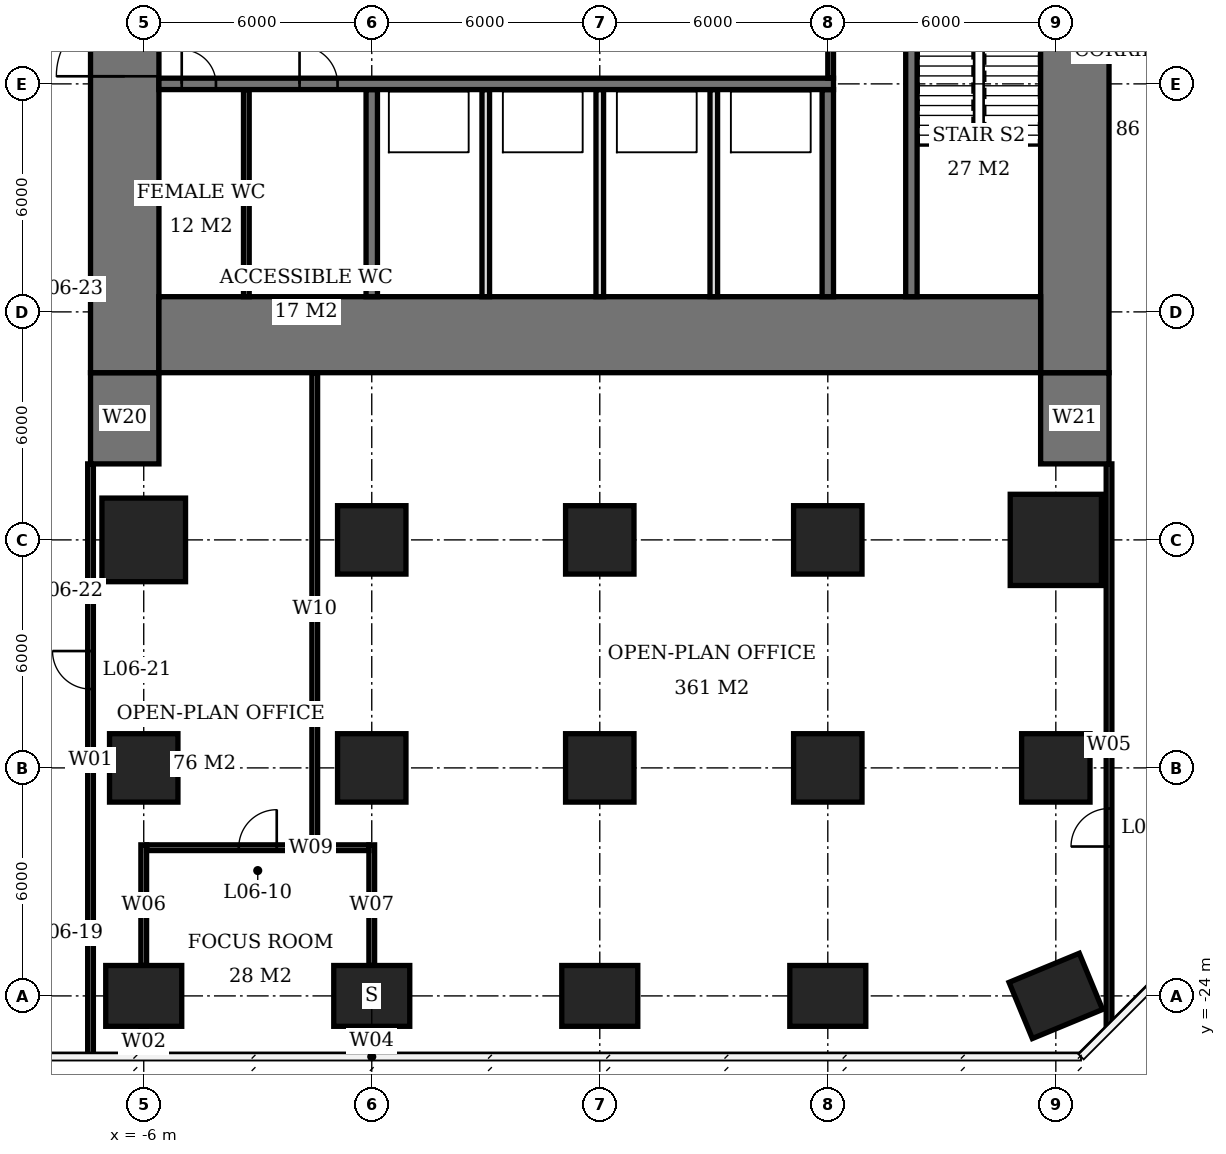
"""IFC4 building model, lengths in metres.
Left out: names, types, materials, properties, quantities, classifications, styles, units other than length and angle.
Written with IfcOpenShell. Run it as: python <this file> out.ifc"""

import sys

from ifc_helpers import new_model, si_unit, direction, frame, frame_2d, origin, origin_2d, place, context, subcontext, project, spatial, rectangle, extrude, element, fill, save


model = new_model("IFC4")
c1 = context("Model", 3, precision=1e-05, world=origin(), true_north=direction((0.0, 1.0)))
c2 = subcontext(c1, "Body", "Model", "MODEL_VIEW")
j1 = project(units=[si_unit("LENGTHUNIT", "METRE"), si_unit("PLANEANGLEUNIT", "RADIAN")], contexts=[c1])
p1 = place(None, origin())
s1 = spatial("IfcSite", under=j1, at=p1, CompositionType="ELEMENT")
p2 = place(p1, origin())
s2 = spatial("IfcBuilding", under=s1, at=p2, CompositionType="ELEMENT")
p3 = place(p2, frame((0.0, 0.0, 29.9)))
s3 = spatial("IfcBuildingStorey", under=s2, at=p3, CompositionType="ELEMENT", Elevation=29.9)
p4 = place(p3, frame((-6.0, -24.0, 0.0), z_axis=(0.0, 0.0, 1.0), x_axis=(1.0, 0.0, 0.0)))
e1 = element("IfcColumn", 1, at=p4, inside=s3, PredefinedType="COLUMN", context=c2, shape_type="SweptSolid", body=[
    extrude(rectangle(XDim=2.0, YDim=1.6, at=origin_2d()), origin(), (0.0, 0.0, 1.0), 3.9),
])
p5 = place(p3, frame((-6.0, -18.0, 0.0), z_axis=(0.0, 0.0, 1.0), x_axis=(1.0, 0.0, 0.0)))
e2 = element("IfcColumn", 2, at=p5, inside=s3, PredefinedType="COLUMN", context=c2, shape_type="SweptSolid", body=[
    extrude(rectangle(XDim=1.8, YDim=1.8, at=origin_2d()), origin(), (0.0, 0.0, 1.0), 3.9),
])
p6 = place(p3, frame((-6.0, -12.0, 0.0), z_axis=(0.0, 0.0, 1.0), x_axis=(1.0, 0.0, 0.0)))
e3 = element("IfcColumn", 3, at=p6, inside=s3, PredefinedType="COLUMN", context=c2, shape_type="SweptSolid", body=[
    extrude(rectangle(XDim=2.2, YDim=2.2, at=origin_2d()), origin(), (0.0, 0.0, 1.0), 3.9),
])
p7 = place(p3, frame((0.0, -24.0, 0.0), z_axis=(0.0, 0.0, 1.0), x_axis=(1.0, 0.0, 0.0)))
e4 = element("IfcColumn", 4, at=p7, inside=s3, PredefinedType="COLUMN", context=c2, shape_type="SweptSolid", body=[
    extrude(rectangle(XDim=2.0, YDim=1.6, at=origin_2d()), origin(), (0.0, 0.0, 1.0), 3.9),
])
for number, where, z_axis, x_axis in (
    (5, (0.0, -18.0, 0.0), (0.0, 0.0, 1.0), (1.0, 0.0, 0.0)),
    (6, (0.0, -12.0, 0.0), (0.0, 0.0, 1.0), (1.0, 0.0, 0.0)),
):
    element("IfcColumn", number, at=place(p3, frame(where, z_axis=z_axis, x_axis=x_axis)), inside=s3, PredefinedType="COLUMN", context=c2, shape_type="SweptSolid", body=[
        extrude(rectangle(XDim=1.8, YDim=1.8, at=origin_2d()), origin(), (0.0, 0.0, 1.0), 3.9),
    ])
p8 = place(p3, frame((6.0, -24.0, 0.0), z_axis=(0.0, 0.0, 1.0), x_axis=(1.0, 0.0, 0.0)))
e7 = element("IfcColumn", 7, at=p8, inside=s3, PredefinedType="COLUMN", context=c2, shape_type="SweptSolid", body=[
    extrude(rectangle(XDim=2.0, YDim=1.6, at=origin_2d()), origin(), (0.0, 0.0, 1.0), 3.9),
])
for number, where, z_axis, x_axis in (
    (8, (6.0, -18.0, 0.0), (0.0, 0.0, 1.0), (1.0, 0.0, 0.0)),
    (9, (6.0, -12.0, 0.0), (0.0, 0.0, 1.0), (1.0, 0.0, 0.0)),
):
    element("IfcColumn", number, at=place(p3, frame(where, z_axis=z_axis, x_axis=x_axis)), inside=s3, PredefinedType="COLUMN", context=c2, shape_type="SweptSolid", body=[
        extrude(rectangle(XDim=1.8, YDim=1.8, at=origin_2d()), origin(), (0.0, 0.0, 1.0), 3.9),
    ])
p9 = place(p3, frame((12.0, -24.0, 0.0), z_axis=(0.0, 0.0, 1.0), x_axis=(1.0, 0.0, 0.0)))
e10 = element("IfcColumn", 10, at=p9, inside=s3, PredefinedType="COLUMN", context=c2, shape_type="SweptSolid", body=[
    extrude(rectangle(XDim=2.0, YDim=1.6, at=origin_2d()), origin(), (0.0, 0.0, 1.0), 3.9),
])
for number, where, z_axis, x_axis in (
    (11, (12.0, -18.0, 0.0), (0.0, 0.0, 1.0), (1.0, 0.0, 0.0)),
    (12, (12.0, -12.0, 0.0), (0.0, 0.0, 1.0), (1.0, 0.0, 0.0)),
):
    element("IfcColumn", number, at=place(p3, frame(where, z_axis=z_axis, x_axis=x_axis)), inside=s3, PredefinedType="COLUMN", context=c2, shape_type="SweptSolid", body=[
        extrude(rectangle(XDim=1.8, YDim=1.8, at=origin_2d()), origin(), (0.0, 0.0, 1.0), 3.9),
    ])
p10 = place(p3, frame((18.0, -24.0, 0.0), z_axis=(0.0, 0.0, 1.0), x_axis=(-0.923879532511, -0.382683432365, 0.0)))
e13 = element("IfcColumn", 13, at=p10, inside=s3, PredefinedType="COLUMN", context=c2, shape_type="SweptSolid", body=[
    extrude(rectangle(XDim=2.0, YDim=1.6, at=origin_2d()), origin(), (0.0, 0.0, 1.0), 3.9),
])
p11 = place(p3, frame((18.0, -18.0, 0.0), z_axis=(0.0, 0.0, 1.0), x_axis=(1.0, 0.0, 0.0)))
e14 = element("IfcColumn", 14, at=p11, inside=s3, PredefinedType="COLUMN", context=c2, shape_type="SweptSolid", body=[
    extrude(rectangle(XDim=1.8, YDim=1.8, at=origin_2d()), origin(), (0.0, 0.0, 1.0), 3.9),
])
p12 = place(p3, frame((18.0, -12.0, 0.0), z_axis=(0.0, 0.0, 1.0), x_axis=(1.0, 0.0, 0.0)))
e15 = element("IfcColumn", 15, at=p12, inside=s3, PredefinedType="COLUMN", context=c2, shape_type="SweptSolid", body=[
    extrude(rectangle(XDim=2.4, YDim=2.4, at=origin_2d()), origin(), (0.0, 0.0, 1.0), 3.9),
])
p13 = place(p3, frame((-5.6, -6.6, 0.0), z_axis=(0.0, 0.0, 1.0), x_axis=(1.0, 0.0, 0.0)))
e16 = element("IfcWall", 16, at=p13, inside=s3, PredefinedType="SHEAR", context=c2, shape_type="SweptSolid", body=[
    extrude(rectangle(XDim=23.2, YDim=2.0, at=frame_2d((11.6, 0.0))), origin(), (0.0, 0.0, 1.0), 3.9),
])
p14 = place(p3, frame((-6.5, -7.6, 0.0), z_axis=(0.0, 0.0, 1.0), x_axis=(0.0, 1.0, 0.0)))
e17 = element("IfcWall", 17, at=p14, inside=s3, PredefinedType="SHEAR", context=c2, shape_type="SweptSolid", body=[
    extrude(rectangle(XDim=21.2, YDim=1.8, at=frame_2d((10.6, 0.0))), origin(), (0.0, 0.0, 1.0), 3.9),
])
p15 = place(p14, frame((7.8, 0.0, 0.0)))
e18 = element("IfcOpeningElement", 18, at=p15, cuts=e17, PredefinedType="OPENING", context=c2, shape_type="SweptSolid", body=[
    extrude(rectangle(XDim=1.8, YDim=2.4, at=frame_2d((0.9, 1.2))), frame((0.0, 0.91, 0.0), z_axis=(0.0, -1.0, 0.0), x_axis=(1.0, 0.0, 0.0)), (0.0, 0.0, 1.0), 1.82),
])
p16 = place(p3, frame((18.5, -7.6, 0.0), z_axis=(0.0, 0.0, 1.0), x_axis=(0.0, 1.0, 0.0)))
e19 = element("IfcWall", 19, at=p16, inside=s3, PredefinedType="SHEAR", context=c2, shape_type="SweptSolid", body=[
    extrude(rectangle(XDim=21.2, YDim=1.8, at=frame_2d((10.6, 0.0))), origin(), (0.0, 0.0, 1.0), 3.9),
])
p17 = place(p16, frame((9.2, 0.0, 0.0)))
e20 = element("IfcOpeningElement", 20, at=p17, cuts=e19, PredefinedType="OPENING", context=c2, shape_type="SweptSolid", body=[
    extrude(rectangle(XDim=1.8, YDim=2.4, at=frame_2d((0.9, 1.2))), frame((0.0, 0.91, 0.0), z_axis=(0.0, -1.0, 0.0), x_axis=(1.0, 0.0, 0.0)), (0.0, 0.0, 1.0), 1.82),
])
for number, where, z_axis, x_axis in (
    (21, (-6.5, -10.0, 0.0), (0.0, 0.0, 1.0), (0.0, 1.0, 0.0)),
    (22, (18.5, -10.0, 0.0), (0.0, 0.0, 1.0), (0.0, 1.0, 0.0)),
):
    element("IfcWall", number, at=place(p3, frame(where, z_axis=z_axis, x_axis=x_axis)), inside=s3, PredefinedType="SHEAR", context=c2, shape_type="SweptSolid", body=[
        extrude(rectangle(XDim=2.4, YDim=1.8, at=frame_2d((1.2, 0.0))), origin(), (0.0, 0.0, 1.0), 3.9),
    ])
p18 = place(p3, frame((-5.6, 0.0, 0.0), z_axis=(0.0, 0.0, 1.0), x_axis=(1.0, 0.0, 0.0)))
e23 = element("IfcWall", 23, at=p18, inside=s3, PredefinedType="SHEAR", context=c2, shape_type="SweptSolid", body=[
    extrude(rectangle(XDim=17.75, YDim=0.3, at=frame_2d((8.875, 0.0))), origin(), (0.0, 0.0, 1.0), 3.9),
])
p19 = place(p18, frame((0.6, 0.0, 0.0)))
e24 = element("IfcOpeningElement", 24, at=p19, cuts=e23, PredefinedType="OPENING", context=c2, shape_type="SweptSolid", body=[
    extrude(rectangle(XDim=0.9, YDim=2.1, at=frame_2d((0.45, 1.05))), frame((0.0, 0.16, 0.0), z_axis=(0.0, -1.0, 0.0), x_axis=(1.0, 0.0, 0.0)), (0.0, 0.0, 1.0), 0.32),
])
p20 = place(p18, frame((3.7, 0.0, 0.0)))
e25 = element("IfcOpeningElement", 25, at=p20, cuts=e23, PredefinedType="OPENING", context=c2, shape_type="SweptSolid", body=[
    extrude(rectangle(XDim=1.0, YDim=2.1, at=frame_2d((0.5, 1.05))), frame((0.0, 0.16, 0.0), z_axis=(0.0, -1.0, 0.0), x_axis=(1.0, 0.0, 0.0)), (0.0, 0.0, 1.0), 0.32),
])
for number, where, z_axis, x_axis in (
    (26, (0.0, -5.6, 0.0), (0.0, 0.0, 1.0), (0.0, 1.0, 0.0)),
    (27, (12.0, -5.6, 0.0), (0.0, 0.0, 1.0), (0.0, 1.0, 0.0)),
):
    element("IfcWall", number, at=place(p3, frame(where, z_axis=z_axis, x_axis=x_axis)), inside=s3, PredefinedType="SHEAR", context=c2, shape_type="SweptSolid", body=[
        extrude(rectangle(XDim=5.45, YDim=0.3, at=frame_2d((2.725, 0.0))), origin(), (0.0, 0.0, 1.0), 3.9),
    ])
p21 = place(p3, frame((14.2, -5.6, 0.0), z_axis=(0.0, 0.0, 1.0), x_axis=(0.0, 1.0, 0.0)))
e28 = element("IfcWall", 28, at=p21, inside=s3, PredefinedType="SHEAR", context=c2, shape_type="SweptSolid", body=[
    extrude(rectangle(XDim=8.45, YDim=0.3, at=frame_2d((4.225, 0.0))), origin(), (0.0, 0.0, 1.0), 3.9),
])
for number, where, z_axis, x_axis in (
    (29, (3.0, -5.6, 0.0), (0.0, 0.0, 1.0), (0.0, 1.0, 0.0)),
    (30, (6.0, -5.6, 0.0), (0.0, 0.0, 1.0), (0.0, 1.0, 0.0)),
    (31, (9.0, -5.6, 0.0), (0.0, 0.0, 1.0), (0.0, 1.0, 0.0)),
):
    element("IfcWall", number, at=place(p3, frame(where, z_axis=z_axis, x_axis=x_axis)), inside=s3, PredefinedType="SOLIDWALL", context=c2, shape_type="SweptSolid", body=[
        extrude(rectangle(XDim=5.45, YDim=0.2, at=frame_2d((2.725, 0.0))), origin(), (0.0, 0.0, 1.0), 3.9),
    ])
p22 = place(p3, frame((-3.3, -5.6, 0.0), z_axis=(0.0, 0.0, 1.0), x_axis=(0.0, 1.0, 0.0)))
e32 = element("IfcWall", 32, at=p22, inside=s3, PredefinedType="PLUMBINGWALL", context=c2, shape_type="SweptSolid", body=[
    extrude(rectangle(XDim=5.45, YDim=0.15, at=frame_2d((2.725, 0.0))), origin(), (0.0, 0.0, 1.0), 3.65),
])
p23 = place(p3, frame((-5.925, -20.1, 0.0), z_axis=(0.0, 0.0, 1.0), x_axis=(1.0, 0.0, 0.0)))
e33 = element("IfcWall", 33, at=p23, inside=s3, PredefinedType="PARTITIONING", context=c2, shape_type="SweptSolid", body=[
    extrude(rectangle(XDim=5.85, YDim=0.15, at=frame_2d((2.925, 0.0))), origin(), (0.0, 0.0, 1.0), 3.65),
])
p24 = place(p23, frame((2.425, 0.0, 0.0)))
e34 = element("IfcOpeningElement", 34, at=p24, cuts=e33, PredefinedType="OPENING", context=c2, shape_type="SweptSolid", body=[
    extrude(rectangle(XDim=1.0, YDim=2.1, at=frame_2d((0.5, 1.05))), frame((0.0, 0.085, 0.0), z_axis=(0.0, -1.0, 0.0), x_axis=(1.0, 0.0, 0.0)), (0.0, 0.0, 1.0), 0.17),
])
p25 = place(p3, frame((-6.0, -25.6, 0.0), z_axis=(0.0, 0.0, 1.0), x_axis=(0.0, 1.0, 0.0)))
e35 = element("IfcWall", 35, at=p25, inside=s3, PredefinedType="PARTITIONING", context=c2, shape_type="SweptSolid", body=[
    extrude(rectangle(XDim=0.8, YDim=0.15, at=frame_2d((0.4, 0.0))), origin(), (0.0, 0.0, 1.0), 3.65),
])
p26 = place(p3, frame((-6.0, -23.2, 0.0), z_axis=(0.0, 0.0, 1.0), x_axis=(0.0, 1.0, 0.0)))
e36 = element("IfcWall", 36, at=p26, inside=s3, PredefinedType="PARTITIONING", context=c2, shape_type="SweptSolid", body=[
    extrude(rectangle(XDim=3.175, YDim=0.15, at=frame_2d((1.587, 0.0))), origin(), (0.0, 0.0, 1.0), 3.65),
])
p27 = place(p3, frame((0.0, -25.55, 0.0), z_axis=(0.0, 0.0, 1.0), x_axis=(0.0, 1.0, 0.0)))
e37 = element("IfcWall", 37, at=p27, inside=s3, PredefinedType="PARTITIONING", context=c2, shape_type="SweptSolid", body=[
    extrude(rectangle(XDim=0.75, YDim=0.15, at=frame_2d((0.375, 0.0))), origin(), (0.0, 0.0, 1.0), 3.65),
])
p28 = place(p3, frame((0.0, -23.2, 0.0), z_axis=(0.0, 0.0, 1.0), x_axis=(0.0, 1.0, 0.0)))
e38 = element("IfcWall", 38, at=p28, inside=s3, PredefinedType="PARTITIONING", context=c2, shape_type="SweptSolid", body=[
    extrude(rectangle(XDim=3.175, YDim=0.15, at=frame_2d((1.587, 0.0))), origin(), (0.0, 0.0, 1.0), 3.65),
])
p29 = place(p3, frame((-7.4, -25.6, 0.0), z_axis=(0.0, 0.0, 1.0), x_axis=(0.0, 1.0, 0.0)))
e39 = element("IfcWall", 39, at=p29, inside=s3, PredefinedType="PARTITIONING", context=c2, shape_type="SweptSolid", body=[
    extrude(rectangle(XDim=15.6, YDim=0.15, at=frame_2d((7.8, 0.0))), origin(), (0.0, 0.0, 1.0), 3.65),
])
p30 = place(p29, frame((9.675, 0.0, 0.0)))
e40 = element("IfcOpeningElement", 40, at=p30, cuts=e39, PredefinedType="OPENING", context=c2, shape_type="SweptSolid", body=[
    extrude(rectangle(XDim=1.0, YDim=2.1, at=frame_2d((0.5, 1.05))), frame((0.0, 0.085, 0.0), z_axis=(0.0, -1.0, 0.0), x_axis=(1.0, 0.0, 0.0)), (0.0, 0.0, 1.0), 0.17),
])
p31 = place(p3, frame((-1.5, -20.025, 0.0), z_axis=(0.0, 0.0, 1.0), x_axis=(0.0, 1.0, 0.0)))
e41 = element("IfcWall", 41, at=p31, inside=s3, PredefinedType="PARTITIONING", context=c2, shape_type="SweptSolid", body=[
    extrude(rectangle(XDim=12.425, YDim=0.15, at=frame_2d((6.212, 0.0))), origin(), (0.0, 0.0, 1.0), 3.65),
])
p32 = place(p3, frame((19.4, -24.771, 0.0), z_axis=(0.0, 0.0, 1.0), x_axis=(0.0, 1.0, 0.0)))
e42 = element("IfcWall", 42, at=p32, inside=s3, PredefinedType="PARTITIONING", context=c2, shape_type="SweptSolid", body=[
    extrude(rectangle(XDim=14.771, YDim=0.15, at=frame_2d((7.385, 0.0))), origin(), (0.0, 0.0, 1.0), 3.65),
])
p33 = place(p32, frame((4.702, 0.0, 0.0)))
e43 = element("IfcOpeningElement", 43, at=p33, cuts=e42, PredefinedType="OPENING", context=c2, shape_type="SweptSolid", body=[
    extrude(rectangle(XDim=1.0, YDim=2.1, at=frame_2d((0.5, 1.05))), frame((0.0, 0.085, 0.0), z_axis=(0.0, -1.0, 0.0), x_axis=(1.0, 0.0, 0.0)), (0.0, 0.0, 1.0), 0.17),
])
p34 = place(p3, frame((12.075, 0.15, 0.0), z_axis=(0.0, 0.0, 1.0), x_axis=(0.0, 1.0, 0.0)))
e44 = element("IfcWall", 44, at=p34, inside=s3, PredefinedType="PARTITIONING", context=c2, shape_type="SweptSolid", body=[
    extrude(rectangle(XDim=3.0, YDim=0.15, at=frame_2d((1.5, 0.0))), origin(), (0.0, 0.0, 1.0), 3.65),
])
p35 = place(p15, origin())
e45 = element("IfcDoor", 45, at=p35, inside=s3, OperationType="DOUBLE_DOOR_SINGLE_SWING", PredefinedType="DOOR", context=c2, shape_type="SweptSolid", body=[
    extrude(rectangle(XDim=1.8, YDim=2.4, at=frame_2d((0.9, 1.2))), frame((0.0, 0.025, 0.0), z_axis=(0.0, -1.0, 0.0), x_axis=(1.0, 0.0, 0.0)), (0.0, 0.0, 1.0), 0.05),
])
fill(e18, e45)
p36 = place(p19, origin())
e46 = element("IfcDoor", 46, at=p36, inside=s3, OperationType="SINGLE_SWING_LEFT", PredefinedType="DOOR", context=c2, shape_type="SweptSolid", body=[
    extrude(rectangle(XDim=0.9, YDim=2.1, at=frame_2d((0.45, 1.05))), frame((0.0, 0.025, 0.0), z_axis=(0.0, -1.0, 0.0), x_axis=(1.0, 0.0, 0.0)), (0.0, 0.0, 1.0), 0.05),
])
fill(e24, e46)
p37 = place(p20, origin())
e47 = element("IfcDoor", 47, at=p37, inside=s3, OperationType="SINGLE_SWING_LEFT", PredefinedType="DOOR", context=c2, shape_type="SweptSolid", body=[
    extrude(rectangle(XDim=1.0, YDim=2.1, at=frame_2d((0.5, 1.05))), frame((0.0, 0.025, 0.0), z_axis=(0.0, -1.0, 0.0), x_axis=(1.0, 0.0, 0.0)), (0.0, 0.0, 1.0), 0.05),
])
fill(e25, e47)
p38 = place(p24, origin())
e48 = element("IfcDoor", 48, at=p38, inside=s3, OperationType="SINGLE_SWING_RIGHT", PredefinedType="DOOR", context=c2, shape_type="SweptSolid", body=[
    extrude(rectangle(XDim=1.0, YDim=2.1, at=frame_2d((0.5, 1.05))), frame((0.0, 0.025, 0.0), z_axis=(0.0, -1.0, 0.0), x_axis=(1.0, 0.0, 0.0)), (0.0, 0.0, 1.0), 0.05),
])
fill(e34, e48)
p39 = place(p33, origin())
e49 = element("IfcDoor", 49, at=p39, inside=s3, OperationType="SINGLE_SWING_LEFT", PredefinedType="DOOR", context=c2, shape_type="SweptSolid", body=[
    extrude(rectangle(XDim=1.0, YDim=2.1, at=frame_2d((0.5, 1.05))), frame((0.0, 0.025, 0.0), z_axis=(0.0, -1.0, 0.0), x_axis=(1.0, 0.0, 0.0)), (0.0, 0.0, 1.0), 0.05),
])
fill(e43, e49)
p40 = place(p30, origin())
e50 = element("IfcDoor", 50, at=p40, inside=s3, OperationType="SINGLE_SWING_RIGHT", PredefinedType="DOOR", context=c2, shape_type="SweptSolid", body=[
    extrude(rectangle(XDim=1.0, YDim=2.1, at=frame_2d((0.5, 1.05))), frame((0.0, 0.025, 0.0), z_axis=(0.0, -1.0, 0.0), x_axis=(1.0, 0.0, 0.0)), (0.0, 0.0, 1.0), 0.05),
])
fill(e40, e50)
save(model, sys.argv[1])
